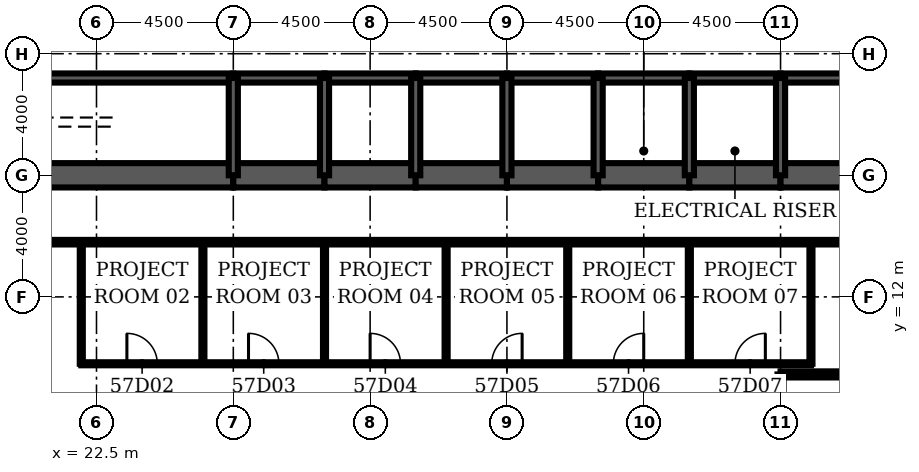
"""IFC4 building model, lengths in metres.
Left out: names, types, materials, properties, quantities, classifications, styles, units other than length and angle.
Written with IfcOpenShell. Run it as: python <this file> out.ifc"""

import sys

from ifc_helpers import new_model, si_unit, direction, frame, frame_2d, origin, place, context, subcontext, project, spatial, rectangle, extrude, element, fill, save


model = new_model("IFC4")
c1 = context("Model", 3, precision=1e-05, world=origin(), true_north=direction((0.0, 1.0)))
c2 = subcontext(c1, "Body", "Model", "MODEL_VIEW")
j1 = project(units=[si_unit("LENGTHUNIT", "METRE"), si_unit("PLANEANGLEUNIT", "RADIAN")], contexts=[c1])
p1 = place(None, origin())
s1 = spatial("IfcSite", under=j1, at=p1, CompositionType="ELEMENT")
p2 = place(p1, origin())
s2 = spatial("IfcBuilding", under=s1, at=p2, CompositionType="ELEMENT")
p3 = place(p2, frame((0.0, 0.0, 253.0)))
s3 = spatial("IfcBuildingStorey", under=s2, at=p3, CompositionType="ELEMENT", Elevation=253.0)
p4 = place(p3, frame((17.6, 16.0, 0.0), z_axis=(0.0, 0.0, 1.0), x_axis=(1.0, 0.0, 0.0)))
e1 = element("IfcWall", 1, at=p4, inside=s3, PredefinedType="SHEAR", context=c2, shape_type="SweptSolid", body=[
    extrude(rectangle(XDim=9.4, YDim=0.8, at=frame_2d((4.7, 0.0))), origin(), (0.0, 0.0, 1.0), 4.2),
])
for number, where, z_axis, x_axis in (
    (2, (27.0, 16.0, 0.0), (0.0, 0.0, 1.0), (1.0, 0.0, 0.0)),
    (3, (30.0, 16.0, 0.0), (0.0, 0.0, 1.0), (1.0, 0.0, 0.0)),
    (4, (33.0, 16.0, 0.0), (0.0, 0.0, 1.0), (1.0, 0.0, 0.0)),
    (5, (36.0, 16.0, 0.0), (0.0, 0.0, 1.0), (1.0, 0.0, 0.0)),
    (6, (39.0, 16.0, 0.0), (0.0, 0.0, 1.0), (1.0, 0.0, 0.0)),
    (7, (42.0, 16.0, 0.0), (0.0, 0.0, 1.0), (1.0, 0.0, 0.0)),
):
    element("IfcWall", number, at=place(p3, frame(where, z_axis=z_axis, x_axis=x_axis)), inside=s3, PredefinedType="SHEAR", context=c2, shape_type="SweptSolid", body=[
        extrude(rectangle(XDim=3.0, YDim=0.8, at=frame_2d((1.5, 0.0))), origin(), (0.0, 0.0, 1.0), 4.2),
    ])
p5 = place(p3, frame((45.0, 16.0, 0.0), z_axis=(0.0, 0.0, 1.0), x_axis=(1.0, 0.0, 0.0)))
e8 = element("IfcWall", 8, at=p5, inside=s3, PredefinedType="SHEAR", context=c2, shape_type="SweptSolid", body=[
    extrude(rectangle(XDim=9.4, YDim=0.8, at=frame_2d((4.7, 0.0))), origin(), (0.0, 0.0, 1.0), 4.2),
])
p6 = place(p3, frame((18.0, 19.2, 0.0), z_axis=(0.0, 0.0, 1.0), x_axis=(1.0, 0.0, 0.0)))
e9 = element("IfcWall", 9, at=p6, inside=s3, PredefinedType="SOLIDWALL", context=c2, shape_type="SweptSolid", body=[
    extrude(rectangle(XDim=9.0, YDim=0.3, at=frame_2d((4.5, 0.0))), origin(), (0.0, 0.0, 1.0), 4.2),
])
p7 = place(p6, frame((0.65, 0.0, 0.0)))
e10 = element("IfcOpeningElement", 10, at=p7, cuts=e9, PredefinedType="OPENING", context=c2, shape_type="SweptSolid", body=[
    extrude(rectangle(XDim=1.0, YDim=2.1, at=frame_2d((0.5, 1.05))), frame((0.0, 0.16, 0.0), z_axis=(0.0, -1.0, 0.0), x_axis=(1.0, 0.0, 0.0)), (0.0, 0.0, 1.0), 0.32),
])
p8 = place(p3, frame((27.0, 19.2, 0.0), z_axis=(0.0, 0.0, 1.0), x_axis=(1.0, 0.0, 0.0)))
e11 = element("IfcWall", 11, at=p8, inside=s3, PredefinedType="SOLIDWALL", context=c2, shape_type="SweptSolid", body=[
    extrude(rectangle(XDim=3.0, YDim=0.3, at=frame_2d((1.5, 0.0))), origin(), (0.0, 0.0, 1.0), 4.2),
])
p9 = place(p8, frame((0.95, 0.0, 0.0)))
e12 = element("IfcOpeningElement", 12, at=p9, cuts=e11, PredefinedType="OPENING", context=c2, shape_type="SweptSolid", body=[
    extrude(rectangle(XDim=1.1, YDim=2.2, at=frame_2d((0.55, 1.1))), frame((0.0, 0.16, 0.0), z_axis=(0.0, -1.0, 0.0), x_axis=(1.0, 0.0, 0.0)), (0.0, 0.0, 1.0), 0.32),
])
p10 = place(p3, frame((30.0, 19.2, 0.0), z_axis=(0.0, 0.0, 1.0), x_axis=(1.0, 0.0, 0.0)))
e13 = element("IfcWall", 13, at=p10, inside=s3, PredefinedType="SOLIDWALL", context=c2, shape_type="SweptSolid", body=[
    extrude(rectangle(XDim=3.0, YDim=0.3, at=frame_2d((1.5, 0.0))), origin(), (0.0, 0.0, 1.0), 4.2),
])
p11 = place(p10, frame((0.95, 0.0, 0.0)))
e14 = element("IfcOpeningElement", 14, at=p11, cuts=e13, PredefinedType="OPENING", context=c2, shape_type="SweptSolid", body=[
    extrude(rectangle(XDim=1.1, YDim=2.2, at=frame_2d((0.55, 1.1))), frame((0.0, 0.16, 0.0), z_axis=(0.0, -1.0, 0.0), x_axis=(1.0, 0.0, 0.0)), (0.0, 0.0, 1.0), 0.32),
])
p12 = place(p3, frame((33.0, 19.2, 0.0), z_axis=(0.0, 0.0, 1.0), x_axis=(1.0, 0.0, 0.0)))
e15 = element("IfcWall", 15, at=p12, inside=s3, PredefinedType="SOLIDWALL", context=c2, shape_type="SweptSolid", body=[
    extrude(rectangle(XDim=3.0, YDim=0.3, at=frame_2d((1.5, 0.0))), origin(), (0.0, 0.0, 1.0), 4.2),
])
p13 = place(p12, frame((0.95, 0.0, 0.0)))
e16 = element("IfcOpeningElement", 16, at=p13, cuts=e15, PredefinedType="OPENING", context=c2, shape_type="SweptSolid", body=[
    extrude(rectangle(XDim=1.1, YDim=2.2, at=frame_2d((0.55, 1.1))), frame((0.0, 0.16, 0.0), z_axis=(0.0, -1.0, 0.0), x_axis=(1.0, 0.0, 0.0)), (0.0, 0.0, 1.0), 0.32),
])
p14 = place(p3, frame((36.0, 19.2, 0.0), z_axis=(0.0, 0.0, 1.0), x_axis=(1.0, 0.0, 0.0)))
e17 = element("IfcWall", 17, at=p14, inside=s3, PredefinedType="SOLIDWALL", context=c2, shape_type="SweptSolid", body=[
    extrude(rectangle(XDim=3.0, YDim=0.3, at=frame_2d((1.5, 0.0))), origin(), (0.0, 0.0, 1.0), 4.2),
])
p15 = place(p14, frame((0.95, 0.0, 0.0)))
e18 = element("IfcOpeningElement", 18, at=p15, cuts=e17, PredefinedType="OPENING", context=c2, shape_type="SweptSolid", body=[
    extrude(rectangle(XDim=1.1, YDim=2.2, at=frame_2d((0.55, 1.1))), frame((0.0, 0.16, 0.0), z_axis=(0.0, -1.0, 0.0), x_axis=(1.0, 0.0, 0.0)), (0.0, 0.0, 1.0), 0.32),
])
p16 = place(p3, frame((39.0, 19.2, 0.0), z_axis=(0.0, 0.0, 1.0), x_axis=(1.0, 0.0, 0.0)))
e19 = element("IfcWall", 19, at=p16, inside=s3, PredefinedType="SOLIDWALL", context=c2, shape_type="SweptSolid", body=[
    extrude(rectangle(XDim=3.0, YDim=0.3, at=frame_2d((1.5, 0.0))), origin(), (0.0, 0.0, 1.0), 4.2),
])
p17 = place(p16, frame((1.0, 0.0, 0.0)))
e20 = element("IfcOpeningElement", 20, at=p17, cuts=e19, PredefinedType="OPENING", context=c2, shape_type="SweptSolid", body=[
    extrude(rectangle(XDim=1.0, YDim=2.1, at=frame_2d((0.5, 1.05))), frame((0.0, 0.16, 0.0), z_axis=(0.0, -1.0, 0.0), x_axis=(1.0, 0.0, 0.0)), (0.0, 0.0, 1.0), 0.32),
])
p18 = place(p3, frame((42.0, 19.2, 0.0), z_axis=(0.0, 0.0, 1.0), x_axis=(1.0, 0.0, 0.0)))
e21 = element("IfcWall", 21, at=p18, inside=s3, PredefinedType="SOLIDWALL", context=c2, shape_type="SweptSolid", body=[
    extrude(rectangle(XDim=3.0, YDim=0.3, at=frame_2d((1.5, 0.0))), origin(), (0.0, 0.0, 1.0), 4.2),
])
p19 = place(p18, frame((1.0, 0.0, 0.0)))
e22 = element("IfcOpeningElement", 22, at=p19, cuts=e21, PredefinedType="OPENING", context=c2, shape_type="SweptSolid", body=[
    extrude(rectangle(XDim=1.0, YDim=2.1, at=frame_2d((0.5, 1.05))), frame((0.0, 0.16, 0.0), z_axis=(0.0, -1.0, 0.0), x_axis=(1.0, 0.0, 0.0)), (0.0, 0.0, 1.0), 0.32),
])
p20 = place(p3, frame((45.0, 19.2, 0.0), z_axis=(0.0, 0.0, 1.0), x_axis=(1.0, 0.0, 0.0)))
e23 = element("IfcWall", 23, at=p20, inside=s3, PredefinedType="SOLIDWALL", context=c2, shape_type="SweptSolid", body=[
    extrude(rectangle(XDim=9.0, YDim=0.3, at=frame_2d((4.5, 0.0))), origin(), (0.0, 0.0, 1.0), 4.2),
])
p21 = place(p20, frame((7.35, 0.0, 0.0)))
e24 = element("IfcOpeningElement", 24, at=p21, cuts=e23, PredefinedType="OPENING", context=c2, shape_type="SweptSolid", body=[
    extrude(rectangle(XDim=1.0, YDim=2.1, at=frame_2d((0.5, 1.05))), frame((0.0, 0.16, 0.0), z_axis=(0.0, -1.0, 0.0), x_axis=(1.0, 0.0, 0.0)), (0.0, 0.0, 1.0), 0.32),
])
for number, where, z_axis, x_axis in (
    (25, (27.0, 16.0, 0.0), (0.0, 0.0, 1.0), (0.0, 1.0, 0.0)),
    (26, (30.0, 16.0, 0.0), (0.0, 0.0, 1.0), (0.0, 1.0, 0.0)),
    (27, (33.0, 16.0, 0.0), (0.0, 0.0, 1.0), (0.0, 1.0, 0.0)),
    (28, (36.0, 16.0, 0.0), (0.0, 0.0, 1.0), (0.0, 1.0, 0.0)),
    (29, (39.0, 16.0, 0.0), (0.0, 0.0, 1.0), (0.0, 1.0, 0.0)),
    (30, (42.0, 16.0, 0.0), (0.0, 0.0, 1.0), (0.0, 1.0, 0.0)),
    (31, (45.0, 16.0, 0.0), (0.0, 0.0, 1.0), (0.0, 1.0, 0.0)),
):
    element("IfcWall", number, at=place(p3, frame(where, z_axis=z_axis, x_axis=x_axis)), inside=s3, PredefinedType="SOLIDWALL", context=c2, shape_type="SweptSolid", body=[
        extrude(rectangle(XDim=3.2, YDim=0.3, at=frame_2d((1.6, 0.0))), origin(), (0.0, 0.0, 1.0), 4.2),
    ])
p22 = place(p3, frame((39.15, 17.35, 0.0), z_axis=(0.0, 0.0, 1.0), x_axis=(1.0, 0.0, 0.0)))
e32 = element("IfcWall", 32, at=p22, inside=s3, PredefinedType="SOLIDWALL", context=c2, shape_type="SweptSolid", body=[
    extrude(rectangle(XDim=2.7, YDim=0.3, at=frame_2d((1.35, 0.0))), origin(), (0.0, 0.0, 1.0), 4.04),
])
p23 = place(p22, frame((0.85, 0.0, 0.0)))
e33 = element("IfcOpeningElement", 33, at=p23, cuts=e32, PredefinedType="OPENING", context=c2, shape_type="SweptSolid", body=[
    extrude(rectangle(XDim=1.0, YDim=2.1, at=frame_2d((0.5, 1.05))), frame((0.0, 0.16, 0.0), z_axis=(0.0, -1.0, 0.0), x_axis=(1.0, 0.0, 0.0)), (0.0, 0.0, 1.0), 0.32),
])
p24 = place(p3, frame((42.15, 17.35, 0.0), z_axis=(0.0, 0.0, 1.0), x_axis=(1.0, 0.0, 0.0)))
e34 = element("IfcWall", 34, at=p24, inside=s3, PredefinedType="SOLIDWALL", context=c2, shape_type="SweptSolid", body=[
    extrude(rectangle(XDim=2.7, YDim=0.3, at=frame_2d((1.35, 0.0))), origin(), (0.0, 0.0, 1.0), 4.04),
])
p25 = place(p24, frame((0.85, 0.0, 0.0)))
e35 = element("IfcOpeningElement", 35, at=p25, cuts=e34, PredefinedType="OPENING", context=c2, shape_type="SweptSolid", body=[
    extrude(rectangle(XDim=1.0, YDim=2.1, at=frame_2d((0.5, 1.05))), frame((0.0, 0.16, 0.0), z_axis=(0.0, -1.0, 0.0), x_axis=(1.0, 0.0, 0.0)), (0.0, 0.0, 1.0), 0.32),
])
p26 = place(p3, frame((24.5, 19.35, 0.0), z_axis=(0.0, 0.0, 1.0), x_axis=(0.0, 1.0, 0.0)))
e36 = element("IfcWall", 36, at=p26, inside=s3, PredefinedType="PARTITIONING", context=c2, shape_type="SweptSolid", body=[
    extrude(rectangle(XDim=2.5, YDim=0.15, at=frame_2d((1.25, 0.0))), origin(), (0.0, 0.0, 1.0), 3.0),
])
p27 = place(p26, frame((1.15, 0.0, 0.0)))
e37 = element("IfcOpeningElement", 37, at=p27, cuts=e36, PredefinedType="OPENING", context=c2, shape_type="SweptSolid", body=[
    extrude(rectangle(XDim=1.0, YDim=2.1, at=frame_2d((0.5, 1.05))), frame((0.0, 0.085, 0.0), z_axis=(0.0, -1.0, 0.0), x_axis=(1.0, 0.0, 0.0)), (0.0, 0.0, 1.0), 0.17),
])
p28 = place(p3, frame((45.0, 9.45, 0.0), z_axis=(0.0, 0.0, 1.0), x_axis=(1.0, 0.0, 0.0)))
e38 = element("IfcWall", 38, at=p28, inside=s3, PredefinedType="PARTITIONING", context=c2, shape_type="SweptSolid", body=[
    extrude(rectangle(XDim=18.0, YDim=0.2, at=frame_2d((9.0, 0.0))), origin(), (0.0, 0.0, 1.0), 3.0),
])
p29 = place(p28, frame((8.2, 0.0, 0.0)))
e39 = element("IfcOpeningElement", 39, at=p29, cuts=e38, PredefinedType="OPENING", context=c2, shape_type="SweptSolid", body=[
    extrude(rectangle(XDim=1.6, YDim=2.1, at=frame_2d((0.8, 1.05))), frame((0.0, 0.11, 0.0), z_axis=(0.0, -1.0, 0.0), x_axis=(1.0, 0.0, 0.0)), (0.0, 0.0, 1.0), 0.22),
])
p30 = place(p3, frame((22.0, 9.8, 0.0), z_axis=(0.0, 0.0, 1.0), x_axis=(1.0, 0.0, 0.0)))
e40 = element("IfcWall", 40, at=p30, inside=s3, PredefinedType="PARTITIONING", context=c2, shape_type="SweptSolid", body=[
    extrude(rectangle(XDim=24.0, YDim=0.1, at=frame_2d((12.0, 0.0))), origin(), (0.0, 0.0, 1.0), 3.0),
])
p31 = place(p30, frame((1.5, 0.0, 0.0)))
e41 = element("IfcOpeningElement", 41, at=p31, cuts=e40, PredefinedType="OPENING", context=c2, shape_type="SweptSolid", body=[
    extrude(rectangle(XDim=1.0, YDim=2.1, at=frame_2d((0.5, 1.05))), frame((0.0, 0.06, 0.0), z_axis=(0.0, -1.0, 0.0), x_axis=(1.0, 0.0, 0.0)), (0.0, 0.0, 1.0), 0.12),
])
p32 = place(p30, frame((5.5, 0.0, 0.0)))
e42 = element("IfcOpeningElement", 42, at=p32, cuts=e40, PredefinedType="OPENING", context=c2, shape_type="SweptSolid", body=[
    extrude(rectangle(XDim=1.0, YDim=2.1, at=frame_2d((0.5, 1.05))), frame((0.0, 0.06, 0.0), z_axis=(0.0, -1.0, 0.0), x_axis=(1.0, 0.0, 0.0)), (0.0, 0.0, 1.0), 0.12),
])
p33 = place(p30, frame((9.5, 0.0, 0.0)))
e43 = element("IfcOpeningElement", 43, at=p33, cuts=e40, PredefinedType="OPENING", context=c2, shape_type="SweptSolid", body=[
    extrude(rectangle(XDim=1.0, YDim=2.1, at=frame_2d((0.5, 1.05))), frame((0.0, 0.06, 0.0), z_axis=(0.0, -1.0, 0.0), x_axis=(1.0, 0.0, 0.0)), (0.0, 0.0, 1.0), 0.12),
])
p34 = place(p30, frame((13.5, 0.0, 0.0)))
e44 = element("IfcOpeningElement", 44, at=p34, cuts=e40, PredefinedType="OPENING", context=c2, shape_type="SweptSolid", body=[
    extrude(rectangle(XDim=1.0, YDim=2.1, at=frame_2d((0.5, 1.05))), frame((0.0, 0.06, 0.0), z_axis=(0.0, -1.0, 0.0), x_axis=(1.0, 0.0, 0.0)), (0.0, 0.0, 1.0), 0.12),
])
p35 = place(p30, frame((17.5, 0.0, 0.0)))
e45 = element("IfcOpeningElement", 45, at=p35, cuts=e40, PredefinedType="OPENING", context=c2, shape_type="SweptSolid", body=[
    extrude(rectangle(XDim=1.0, YDim=2.1, at=frame_2d((0.5, 1.05))), frame((0.0, 0.06, 0.0), z_axis=(0.0, -1.0, 0.0), x_axis=(1.0, 0.0, 0.0)), (0.0, 0.0, 1.0), 0.12),
])
p36 = place(p30, frame((21.5, 0.0, 0.0)))
e46 = element("IfcOpeningElement", 46, at=p36, cuts=e40, PredefinedType="OPENING", context=c2, shape_type="SweptSolid", body=[
    extrude(rectangle(XDim=1.0, YDim=2.1, at=frame_2d((0.5, 1.05))), frame((0.0, 0.06, 0.0), z_axis=(0.0, -1.0, 0.0), x_axis=(1.0, 0.0, 0.0)), (0.0, 0.0, 1.0), 0.12),
])
p37 = place(p3, frame((15.2, 13.8, 0.0), z_axis=(0.0, 0.0, 1.0), x_axis=(1.0, 0.0, 0.0)))
e47 = element("IfcWall", 47, at=p37, inside=s3, PredefinedType="PARTITIONING", context=c2, shape_type="SweptSolid", body=[
    extrude(rectangle(XDim=41.6, YDim=0.15, at=frame_2d((20.8, 0.0))), origin(), (0.0, 0.0, 1.0), 3.0),
])
p38 = place(p37, frame((4.175, 0.0, 0.0)))
e48 = element("IfcOpeningElement", 48, at=p38, cuts=e47, PredefinedType="OPENING", context=c2, shape_type="SweptSolid", body=[
    extrude(rectangle(XDim=1.2, YDim=2.1, at=frame_2d((0.6, 1.05))), frame((0.0, 0.085, 0.0), z_axis=(0.0, -1.0, 0.0), x_axis=(1.0, 0.0, 0.0)), (0.0, 0.0, 1.0), 0.17),
])
for number, where, z_axis, x_axis in (
    (49, (22.0, 9.8, 0.0), (0.0, 0.0, 1.0), (0.0, 1.0, 0.0)),
    (50, (26.0, 9.8, 0.0), (0.0, 0.0, 1.0), (0.0, 1.0, 0.0)),
    (51, (30.0, 9.8, 0.0), (0.0, 0.0, 1.0), (0.0, 1.0, 0.0)),
    (52, (34.0, 9.8, 0.0), (0.0, 0.0, 1.0), (0.0, 1.0, 0.0)),
    (53, (38.0, 9.8, 0.0), (0.0, 0.0, 1.0), (0.0, 1.0, 0.0)),
    (54, (42.0, 9.8, 0.0), (0.0, 0.0, 1.0), (0.0, 1.0, 0.0)),
):
    element("IfcWall", number, at=place(p3, frame(where, z_axis=z_axis, x_axis=x_axis)), inside=s3, PredefinedType="PARTITIONING", context=c2, shape_type="SweptSolid", body=[
        extrude(rectangle(XDim=4.0, YDim=0.1, at=frame_2d((2.0, 0.0))), origin(), (0.0, 0.0, 1.0), 3.0),
    ])
p39 = place(p3, frame((45.0, 2.45, 0.0), z_axis=(0.0, 0.0, 1.0), x_axis=(0.0, 1.0, 0.0)))
e55 = element("IfcWall", 55, at=p39, inside=s3, PredefinedType="PARTITIONING", context=c2, shape_type="SweptSolid", body=[
    extrude(rectangle(XDim=7.0, YDim=0.2, at=frame_2d((3.5, 0.0))), origin(), (0.0, 0.0, 1.0), 3.0),
])
p40 = place(p3, frame((46.0, 9.8, 0.0), z_axis=(0.0, 0.0, 1.0), x_axis=(0.0, 1.0, 0.0)))
e56 = element("IfcWall", 56, at=p40, inside=s3, PredefinedType="PARTITIONING", context=c2, shape_type="SweptSolid", body=[
    extrude(rectangle(XDim=4.0, YDim=0.1, at=frame_2d((2.0, 0.0))), origin(), (0.0, 0.0, 1.0), 3.0),
])
p41 = place(p23, origin())
e57 = element("IfcDoor", 57, at=p41, inside=s3, OperationType="SINGLE_SWING_LEFT", PredefinedType="DOOR", context=c2, shape_type="SweptSolid", body=[
    extrude(rectangle(XDim=1.0, YDim=2.1, at=frame_2d((0.5, 1.05))), frame((0.0, 0.025, 0.0), z_axis=(0.0, -1.0, 0.0), x_axis=(1.0, 0.0, 0.0)), (0.0, 0.0, 1.0), 0.05),
])
fill(e33, e57)
p42 = place(p25, origin())
e58 = element("IfcDoor", 58, at=p42, inside=s3, OperationType="SINGLE_SWING_LEFT", PredefinedType="DOOR", context=c2, shape_type="SweptSolid", body=[
    extrude(rectangle(XDim=1.0, YDim=2.1, at=frame_2d((0.5, 1.05))), frame((0.0, 0.025, 0.0), z_axis=(0.0, -1.0, 0.0), x_axis=(1.0, 0.0, 0.0)), (0.0, 0.0, 1.0), 0.05),
])
fill(e35, e58)
p43 = place(p31, origin())
e59 = element("IfcDoor", 59, at=p43, inside=s3, OperationType="SINGLE_SWING_LEFT", PredefinedType="DOOR", context=c2, shape_type="SweptSolid", body=[
    extrude(rectangle(XDim=1.0, YDim=2.1, at=frame_2d((0.5, 1.05))), frame((0.0, 0.025, 0.0), z_axis=(0.0, -1.0, 0.0), x_axis=(1.0, 0.0, 0.0)), (0.0, 0.0, 1.0), 0.05),
])
fill(e41, e59)
p44 = place(p32, origin())
e60 = element("IfcDoor", 60, at=p44, inside=s3, OperationType="SINGLE_SWING_LEFT", PredefinedType="DOOR", context=c2, shape_type="SweptSolid", body=[
    extrude(rectangle(XDim=1.0, YDim=2.1, at=frame_2d((0.5, 1.05))), frame((0.0, 0.025, 0.0), z_axis=(0.0, -1.0, 0.0), x_axis=(1.0, 0.0, 0.0)), (0.0, 0.0, 1.0), 0.05),
])
fill(e42, e60)
p45 = place(p33, origin())
e61 = element("IfcDoor", 61, at=p45, inside=s3, OperationType="SINGLE_SWING_LEFT", PredefinedType="DOOR", context=c2, shape_type="SweptSolid", body=[
    extrude(rectangle(XDim=1.0, YDim=2.1, at=frame_2d((0.5, 1.05))), frame((0.0, 0.025, 0.0), z_axis=(0.0, -1.0, 0.0), x_axis=(1.0, 0.0, 0.0)), (0.0, 0.0, 1.0), 0.05),
])
fill(e43, e61)
p46 = place(p34, origin())
e62 = element("IfcDoor", 62, at=p46, inside=s3, OperationType="SINGLE_SWING_RIGHT", PredefinedType="DOOR", context=c2, shape_type="SweptSolid", body=[
    extrude(rectangle(XDim=1.0, YDim=2.1, at=frame_2d((0.5, 1.05))), frame((0.0, 0.025, 0.0), z_axis=(0.0, -1.0, 0.0), x_axis=(1.0, 0.0, 0.0)), (0.0, 0.0, 1.0), 0.05),
])
fill(e44, e62)
p47 = place(p35, origin())
e63 = element("IfcDoor", 63, at=p47, inside=s3, OperationType="SINGLE_SWING_RIGHT", PredefinedType="DOOR", context=c2, shape_type="SweptSolid", body=[
    extrude(rectangle(XDim=1.0, YDim=2.1, at=frame_2d((0.5, 1.05))), frame((0.0, 0.025, 0.0), z_axis=(0.0, -1.0, 0.0), x_axis=(1.0, 0.0, 0.0)), (0.0, 0.0, 1.0), 0.05),
])
fill(e45, e63)
p48 = place(p36, origin())
e64 = element("IfcDoor", 64, at=p48, inside=s3, OperationType="SINGLE_SWING_RIGHT", PredefinedType="DOOR", context=c2, shape_type="SweptSolid", body=[
    extrude(rectangle(XDim=1.0, YDim=2.1, at=frame_2d((0.5, 1.05))), frame((0.0, 0.025, 0.0), z_axis=(0.0, -1.0, 0.0), x_axis=(1.0, 0.0, 0.0)), (0.0, 0.0, 1.0), 0.05),
])
fill(e46, e64)
p49 = place(p9, origin())
e65 = element("IfcDoor", 65, at=p49, inside=s3, OperationType="DOUBLE_DOOR_SLIDING", PredefinedType="USERDEFINED", context=c2, shape_type="SweptSolid", body=[
    extrude(rectangle(XDim=1.1, YDim=2.2, at=frame_2d((0.55, 1.1))), frame((0.0, 0.025, 0.0), z_axis=(0.0, -1.0, 0.0), x_axis=(1.0, 0.0, 0.0)), (0.0, 0.0, 1.0), 0.05),
])
fill(e12, e65)
p50 = place(p11, origin())
e66 = element("IfcDoor", 66, at=p50, inside=s3, OperationType="DOUBLE_DOOR_SLIDING", PredefinedType="USERDEFINED", context=c2, shape_type="SweptSolid", body=[
    extrude(rectangle(XDim=1.1, YDim=2.2, at=frame_2d((0.55, 1.1))), frame((0.0, 0.025, 0.0), z_axis=(0.0, -1.0, 0.0), x_axis=(1.0, 0.0, 0.0)), (0.0, 0.0, 1.0), 0.05),
])
fill(e14, e66)
p51 = place(p13, origin())
e67 = element("IfcDoor", 67, at=p51, inside=s3, OperationType="DOUBLE_DOOR_SLIDING", PredefinedType="USERDEFINED", context=c2, shape_type="SweptSolid", body=[
    extrude(rectangle(XDim=1.1, YDim=2.2, at=frame_2d((0.55, 1.1))), frame((0.0, 0.025, 0.0), z_axis=(0.0, -1.0, 0.0), x_axis=(1.0, 0.0, 0.0)), (0.0, 0.0, 1.0), 0.05),
])
fill(e16, e67)
p52 = place(p15, origin())
e68 = element("IfcDoor", 68, at=p52, inside=s3, OperationType="DOUBLE_DOOR_SLIDING", PredefinedType="USERDEFINED", context=c2, shape_type="SweptSolid", body=[
    extrude(rectangle(XDim=1.1, YDim=2.2, at=frame_2d((0.55, 1.1))), frame((0.0, 0.025, 0.0), z_axis=(0.0, -1.0, 0.0), x_axis=(1.0, 0.0, 0.0)), (0.0, 0.0, 1.0), 0.05),
])
fill(e18, e68)
p53 = place(p17, origin())
e69 = element("IfcDoor", 69, at=p53, inside=s3, OperationType="SINGLE_SWING_LEFT", PredefinedType="DOOR", context=c2, shape_type="SweptSolid", body=[
    extrude(rectangle(XDim=1.0, YDim=2.1, at=frame_2d((0.5, 1.05))), frame((0.0, 0.025, 0.0), z_axis=(0.0, -1.0, 0.0), x_axis=(1.0, 0.0, 0.0)), (0.0, 0.0, 1.0), 0.05),
])
fill(e20, e69)
p54 = place(p19, origin())
e70 = element("IfcDoor", 70, at=p54, inside=s3, OperationType="SINGLE_SWING_LEFT", PredefinedType="DOOR", context=c2, shape_type="SweptSolid", body=[
    extrude(rectangle(XDim=1.0, YDim=2.1, at=frame_2d((0.5, 1.05))), frame((0.0, 0.025, 0.0), z_axis=(0.0, -1.0, 0.0), x_axis=(1.0, 0.0, 0.0)), (0.0, 0.0, 1.0), 0.05),
])
fill(e22, e70)
save(model, sys.argv[1])
